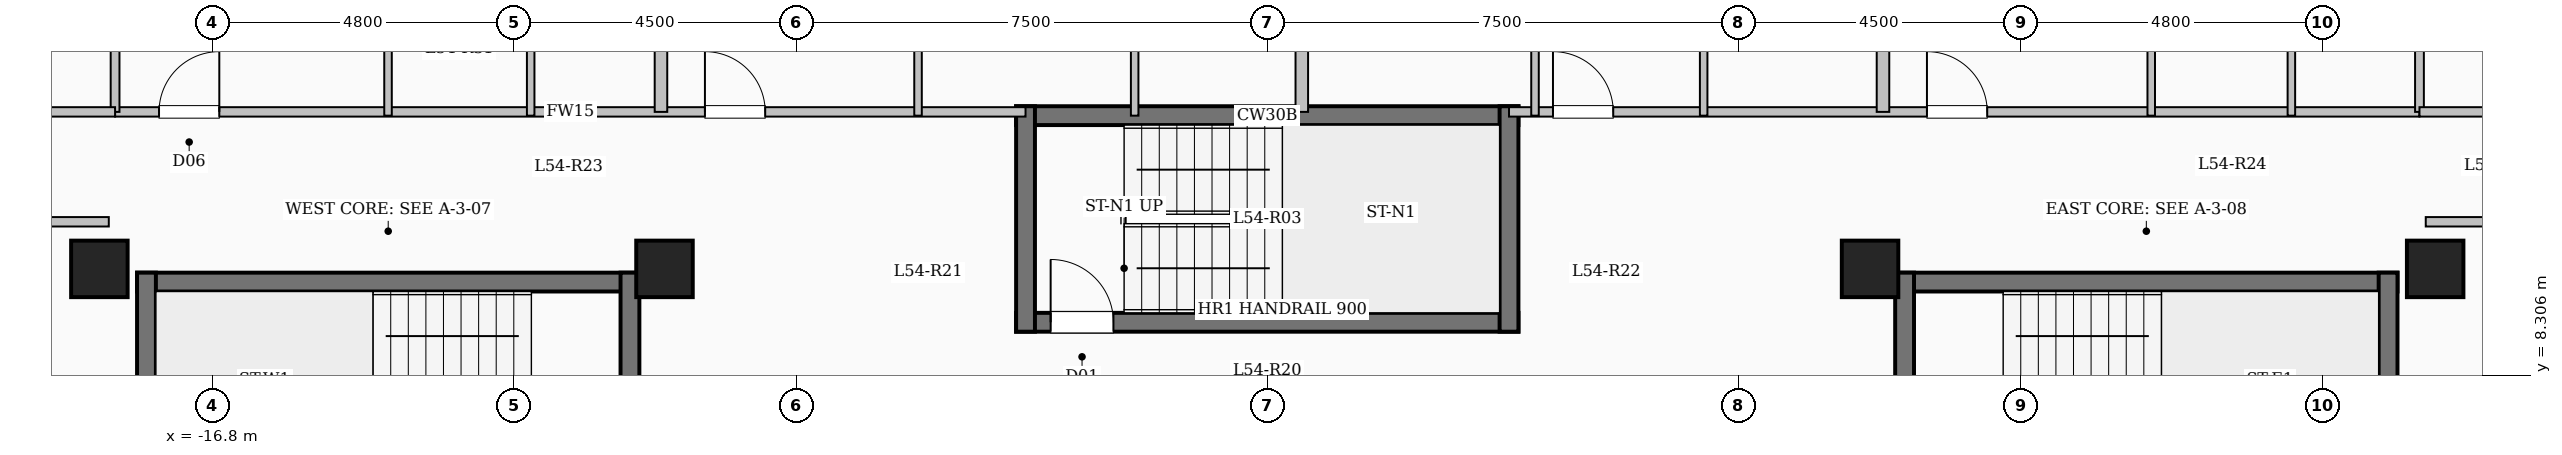
"""IFC4 building model, lengths in metres.
Left out: names, types, materials, properties, quantities, classifications, styles, units other than length and angle.
Written with IfcOpenShell. Run it as: python <this file> out.ifc"""

import sys

from ifc_helpers import new_model, si_unit, direction, frame, frame_2d, origin, origin_2d, place, context, subcontext, project, spatial, rectangle, extrude, element, fill, save


model = new_model("IFC4")
c1 = context("Model", 3, precision=1e-05, world=origin(), true_north=direction((0.0, 1.0)))
c2 = subcontext(c1, "Body", "Model", "MODEL_VIEW")
j1 = project(units=[si_unit("LENGTHUNIT", "METRE"), si_unit("PLANEANGLEUNIT", "RADIAN")], contexts=[c1])
p1 = place(None, origin())
s1 = spatial("IfcSite", under=j1, at=p1, CompositionType="ELEMENT")
p2 = place(p1, origin())
s2 = spatial("IfcBuilding", under=s1, at=p2, CompositionType="ELEMENT")
p3 = place(p2, frame((0.0, 0.0, 200.3)))
s3 = spatial("IfcBuildingStorey", under=s2, at=p3, CompositionType="ELEMENT", Elevation=200.3)
for number, where, z_axis, x_axis in (
    (1, (-9.6, 10.0, 0.0), (0.0, 0.0, 1.0), (1.0, 0.0, 0.0)),
    (2, (9.6, 10.0, 0.0), (0.0, 0.0, 1.0), (1.0, 0.0, 0.0)),
    (3, (-18.6, 10.0, 0.0), (0.0, 0.0, 1.0), (1.0, 0.0, 0.0)),
    (4, (18.6, 10.0, 0.0), (0.0, 0.0, 1.0), (1.0, 0.0, 0.0)),
):
    element("IfcColumn", number, at=place(p3, frame(where, z_axis=z_axis, x_axis=x_axis)), inside=s3, PredefinedType="COLUMN", context=c2, shape_type="SweptSolid", body=[
        extrude(rectangle(XDim=0.9, YDim=0.9, at=origin_2d()), origin(), (0.0, 0.0, 1.0), 3.35),
    ])
p4 = place(p3, frame((-18.0, 9.79, 0.0), z_axis=(0.0, 0.0, 1.0), x_axis=(1.0, 0.0, 0.0)))
e5 = element("IfcWall", 5, at=p4, inside=s3, PredefinedType="SHEAR", context=c2, shape_type="SweptSolid", body=[
    extrude(rectangle(XDim=8.0, YDim=0.3, at=frame_2d((4.0, 0.0))), origin(), (0.0, 0.0, 1.0), 3.35),
])
for number, where, z_axis, x_axis in (
    (6, (-17.85, 6.35, 0.0), (0.0, 0.0, 1.0), (0.0, 1.0, 0.0)),
    (7, (-10.15, 6.35, 0.0), (0.0, 0.0, 1.0), (0.0, 1.0, 0.0)),
):
    element("IfcWall", number, at=place(p3, frame(where, z_axis=z_axis, x_axis=x_axis)), inside=s3, PredefinedType="SHEAR", context=c2, shape_type="SweptSolid", body=[
        extrude(rectangle(XDim=3.59, YDim=0.3, at=frame_2d((1.795, 0.0))), origin(), (0.0, 0.0, 1.0), 3.35),
    ])
p5 = place(p3, frame((10.0, 9.79, 0.0), z_axis=(0.0, 0.0, 1.0), x_axis=(1.0, 0.0, 0.0)))
e8 = element("IfcWall", 8, at=p5, inside=s3, PredefinedType="SHEAR", context=c2, shape_type="SweptSolid", body=[
    extrude(rectangle(XDim=8.0, YDim=0.3, at=frame_2d((4.0, 0.0))), origin(), (0.0, 0.0, 1.0), 3.35),
])
for number, where, z_axis, x_axis in (
    (9, (10.15, 6.35, 0.0), (0.0, 0.0, 1.0), (0.0, 1.0, 0.0)),
    (10, (17.85, 6.35, 0.0), (0.0, 0.0, 1.0), (0.0, 1.0, 0.0)),
):
    element("IfcWall", number, at=place(p3, frame(where, z_axis=z_axis, x_axis=x_axis)), inside=s3, PredefinedType="SHEAR", context=c2, shape_type="SweptSolid", body=[
        extrude(rectangle(XDim=3.59, YDim=0.3, at=frame_2d((1.795, 0.0))), origin(), (0.0, 0.0, 1.0), 3.35),
    ])
p6 = place(p3, frame((-4.0, 12.44, 0.0), z_axis=(0.0, 0.0, 1.0), x_axis=(1.0, 0.0, 0.0)))
e11 = element("IfcWall", 11, at=p6, inside=s3, PredefinedType="SHEAR", context=c2, shape_type="SweptSolid", body=[
    extrude(rectangle(XDim=8.0, YDim=0.3, at=frame_2d((4.0, 0.0))), origin(), (0.0, 0.0, 1.0), 3.35),
])
p7 = place(p3, frame((-4.0, 9.15, 0.0), z_axis=(0.0, 0.0, 1.0), x_axis=(1.0, 0.0, 0.0)))
e12 = element("IfcWall", 12, at=p7, inside=s3, PredefinedType="SHEAR", context=c2, shape_type="SweptSolid", body=[
    extrude(rectangle(XDim=8.0, YDim=0.3, at=frame_2d((4.0, 0.0))), origin(), (0.0, 0.0, 1.0), 3.35),
])
p8 = place(p7, frame((0.55, 0.0, 0.0)))
e13 = element("IfcOpeningElement", 13, at=p8, cuts=e12, PredefinedType="OPENING", context=c2, shape_type="SweptSolid", body=[
    extrude(rectangle(XDim=1.0, YDim=2.15, at=frame_2d((0.5, 1.075))), frame((0.0, 0.16, 0.0), z_axis=(0.0, -1.0, 0.0), x_axis=(1.0, 0.0, 0.0)), (0.0, 0.0, 1.0), 0.32),
])
for number, where, z_axis, x_axis in (
    (14, (-3.85, 9.0, 0.0), (0.0, 0.0, 1.0), (0.0, 1.0, 0.0)),
    (15, (3.85, 9.0, 0.0), (0.0, 0.0, 1.0), (0.0, 1.0, 0.0)),
):
    element("IfcWall", number, at=place(p3, frame(where, z_axis=z_axis, x_axis=x_axis)), inside=s3, PredefinedType="SHEAR", context=c2, shape_type="SweptSolid", body=[
        extrude(rectangle(XDim=3.59, YDim=0.3, at=frame_2d((1.795, 0.0))), origin(), (0.0, 0.0, 1.0), 3.35),
    ])
p9 = place(p3, frame((-18.35, 12.5, 0.0), z_axis=(0.0, 0.0, 1.0), x_axis=(1.0, 0.0, 0.0)))
e16 = element("IfcWall", 16, at=p9, inside=s3, PredefinedType="PARTITIONING", context=c2, shape_type="SweptSolid", body=[
    extrude(rectangle(XDim=14.5, YDim=0.15, at=frame_2d((7.25, 0.0))), origin(), (0.0, 0.0, 1.0), 3.1),
])
p10 = place(p9, frame((0.7, 0.0, 0.0)))
e17 = element("IfcOpeningElement", 17, at=p10, cuts=e16, PredefinedType="OPENING", context=c2, shape_type="SweptSolid", body=[
    extrude(rectangle(XDim=0.96, YDim=2.15, at=frame_2d((0.48, 1.075))), frame((0.0, 0.085, 0.0), z_axis=(0.0, -1.0, 0.0), x_axis=(1.0, 0.0, 0.0)), (0.0, 0.0, 1.0), 0.17),
])
p11 = place(p9, frame((9.394, 0.0, 0.0)))
e18 = element("IfcOpeningElement", 18, at=p11, cuts=e16, PredefinedType="OPENING", context=c2, shape_type="SweptSolid", body=[
    extrude(rectangle(XDim=0.96, YDim=2.15, at=frame_2d((0.48, 1.075))), frame((0.0, 0.085, 0.0), z_axis=(0.0, -1.0, 0.0), x_axis=(1.0, 0.0, 0.0)), (0.0, 0.0, 1.0), 0.17),
])
p12 = place(p3, frame((3.85, 12.5, 0.0), z_axis=(0.0, 0.0, 1.0), x_axis=(1.0, 0.0, 0.0)))
e19 = element("IfcWall", 19, at=p12, inside=s3, PredefinedType="PARTITIONING", context=c2, shape_type="SweptSolid", body=[
    extrude(rectangle(XDim=14.5, YDim=0.15, at=frame_2d((7.25, 0.0))), origin(), (0.0, 0.0, 1.0), 3.1),
])
p13 = place(p12, frame((0.7, 0.0, 0.0)))
e20 = element("IfcOpeningElement", 20, at=p13, cuts=e19, PredefinedType="OPENING", context=c2, shape_type="SweptSolid", body=[
    extrude(rectangle(XDim=0.96, YDim=2.15, at=frame_2d((0.48, 1.075))), frame((0.0, 0.085, 0.0), z_axis=(0.0, -1.0, 0.0), x_axis=(1.0, 0.0, 0.0)), (0.0, 0.0, 1.0), 0.17),
])
p14 = place(p12, frame((6.656, 0.0, 0.0)))
e21 = element("IfcOpeningElement", 21, at=p14, cuts=e19, PredefinedType="OPENING", context=c2, shape_type="SweptSolid", body=[
    extrude(rectangle(XDim=0.96, YDim=2.15, at=frame_2d((0.48, 1.075))), frame((0.0, 0.085, 0.0), z_axis=(0.0, -1.0, 0.0), x_axis=(1.0, 0.0, 0.0)), (0.0, 0.0, 1.0), 0.17),
])
p15 = place(p3, frame((0.55, 12.5, 0.0), z_axis=(0.0, 0.0, 1.0), x_axis=(0.0, 1.0, 0.0)))
e22 = element("IfcWall", 22, at=p15, inside=s3, PredefinedType="SOLIDWALL", context=c2, shape_type="SweptSolid", body=[
    extrude(rectangle(XDim=9.88, YDim=0.2, at=frame_2d((4.94, 0.0))), origin(), (0.0, 0.0, 1.0), 3.1),
])
p16 = place(p3, frame((-9.656, 12.5, 0.0), z_axis=(0.0, 0.0, 1.0), x_axis=(0.0, 1.0, 0.0)))
e23 = element("IfcWall", 23, at=p16, inside=s3, PredefinedType="SOLIDWALL", context=c2, shape_type="SweptSolid", body=[
    extrude(rectangle(XDim=8.732, YDim=0.2, at=frame_2d((4.366, 0.0))), origin(), (0.0, 0.0, 1.0), 3.1),
])
p17 = place(p3, frame((-14.003, 12.44, 0.0), z_axis=(0.0, 0.0, 1.0), x_axis=(0.0, 1.0, 0.0)))
e24 = element("IfcWall", 24, at=p17, inside=s3, PredefinedType="PARTITIONING", context=c2, shape_type="SweptSolid", body=[
    extrude(rectangle(XDim=8.46, YDim=0.12, at=frame_2d((4.23, 0.0))), origin(), (0.0, 0.0, 1.0), 3.1),
])
p18 = place(p17, frame((2.905, 0.0, 0.0)))
e25 = element("IfcOpeningElement", 25, at=p18, cuts=e24, PredefinedType="OPENING", context=c2, shape_type="SweptSolid", body=[
    extrude(rectangle(XDim=1.08, YDim=2.15, at=frame_2d((0.54, 1.075))), frame((0.0, 0.07, 0.0), z_axis=(0.0, -1.0, 0.0), x_axis=(1.0, 0.0, 0.0)), (0.0, 0.0, 1.0), 0.14),
])
p19 = place(p3, frame((-11.731, 12.44, 0.0), z_axis=(0.0, 0.0, 1.0), x_axis=(0.0, 1.0, 0.0)))
e26 = element("IfcWall", 26, at=p19, inside=s3, PredefinedType="PARTITIONING", context=c2, shape_type="SweptSolid", body=[
    extrude(rectangle(XDim=2.62, YDim=0.12, at=frame_2d((1.31, 0.0))), origin(), (0.0, 0.0, 1.0), 3.1),
])
p20 = place(p3, frame((-5.562, 12.44, 0.0), z_axis=(0.0, 0.0, 1.0), x_axis=(0.0, 1.0, 0.0)))
e27 = element("IfcWall", 27, at=p20, inside=s3, PredefinedType="PARTITIONING", context=c2, shape_type="SweptSolid", body=[
    extrude(rectangle(XDim=9.801, YDim=0.12, at=frame_2d((4.9, 0.0))), origin(), (0.0, 0.0, 1.0), 3.1),
])
p21 = place(p20, frame((3.075, 0.0, 0.0)))
e28 = element("IfcOpeningElement", 28, at=p21, cuts=e27, PredefinedType="OPENING", context=c2, shape_type="SweptSolid", body=[
    extrude(rectangle(XDim=1.08, YDim=2.15, at=frame_2d((0.54, 1.075))), frame((0.0, 0.07, 0.0), z_axis=(0.0, -1.0, 0.0), x_axis=(1.0, 0.0, 0.0)), (0.0, 0.0, 1.0), 0.14),
])
p22 = place(p3, frame((-2.112, 12.44, 0.0), z_axis=(0.0, 0.0, 1.0), x_axis=(0.0, 1.0, 0.0)))
e29 = element("IfcWall", 29, at=p22, inside=s3, PredefinedType="PARTITIONING", context=c2, shape_type="SweptSolid", body=[
    extrude(rectangle(XDim=2.79, YDim=0.12, at=frame_2d((1.395, 0.0))), origin(), (0.0, 0.0, 1.0), 3.1),
])
p23 = place(p3, frame((9.806, 12.5, 0.0), z_axis=(0.0, 0.0, 1.0), x_axis=(0.0, 1.0, 0.0)))
e30 = element("IfcWall", 30, at=p23, inside=s3, PredefinedType="SOLIDWALL", context=c2, shape_type="SweptSolid", body=[
    extrude(rectangle(XDim=8.695, YDim=0.2, at=frame_2d((4.348, 0.0))), origin(), (0.0, 0.0, 1.0), 3.1),
])
p24 = place(p3, frame((4.264, 12.44, 0.0), z_axis=(0.0, 0.0, 1.0), x_axis=(0.0, 1.0, 0.0)))
e31 = element("IfcWall", 31, at=p24, inside=s3, PredefinedType="PARTITIONING", context=c2, shape_type="SweptSolid", body=[
    extrude(rectangle(XDim=9.94, YDim=0.12, at=frame_2d((4.97, 0.0))), origin(), (0.0, 0.0, 1.0), 3.1),
])
p25 = place(p24, frame((3.245, 0.0, 0.0)))
e32 = element("IfcOpeningElement", 32, at=p25, cuts=e31, PredefinedType="OPENING", context=c2, shape_type="SweptSolid", body=[
    extrude(rectangle(XDim=1.08, YDim=2.15, at=frame_2d((0.54, 1.075))), frame((0.0, 0.07, 0.0), z_axis=(0.0, -1.0, 0.0), x_axis=(1.0, 0.0, 0.0)), (0.0, 0.0, 1.0), 0.14),
])
p26 = place(p3, frame((6.95, 12.44, 0.0), z_axis=(0.0, 0.0, 1.0), x_axis=(0.0, 1.0, 0.0)))
e33 = element("IfcWall", 33, at=p26, inside=s3, PredefinedType="PARTITIONING", context=c2, shape_type="SweptSolid", body=[
    extrude(rectangle(XDim=2.96, YDim=0.12, at=frame_2d((1.48, 0.0))), origin(), (0.0, 0.0, 1.0), 3.1),
])
p27 = place(p3, frame((14.078, 12.44, 0.0), z_axis=(0.0, 0.0, 1.0), x_axis=(0.0, 1.0, 0.0)))
e34 = element("IfcWall", 34, at=p27, inside=s3, PredefinedType="PARTITIONING", context=c2, shape_type="SweptSolid", body=[
    extrude(rectangle(XDim=8.46, YDim=0.12, at=frame_2d((4.23, 0.0))), origin(), (0.0, 0.0, 1.0), 3.1),
])
p28 = place(p27, frame((2.735, 0.0, 0.0)))
e35 = element("IfcOpeningElement", 35, at=p28, cuts=e34, PredefinedType="OPENING", context=c2, shape_type="SweptSolid", body=[
    extrude(rectangle(XDim=1.08, YDim=2.15, at=frame_2d((0.54, 1.075))), frame((0.0, 0.07, 0.0), z_axis=(0.0, -1.0, 0.0), x_axis=(1.0, 0.0, 0.0)), (0.0, 0.0, 1.0), 0.14),
])
p29 = place(p3, frame((16.31, 12.44, 0.0), z_axis=(0.0, 0.0, 1.0), x_axis=(0.0, 1.0, 0.0)))
e36 = element("IfcWall", 36, at=p29, inside=s3, PredefinedType="PARTITIONING", context=c2, shape_type="SweptSolid", body=[
    extrude(rectangle(XDim=2.45, YDim=0.12, at=frame_2d((1.225, 0.0))), origin(), (0.0, 0.0, 1.0), 3.1),
])
for number, where, z_axis, x_axis in (
    (37, (-23.58, 10.75, 0.0), (0.0, 0.0, 1.0), (1.0, 0.0, 0.0)),
    (38, (18.45, 10.75, 0.0), (0.0, 0.0, 1.0), (1.0, 0.0, 0.0)),
):
    element("IfcWall", number, at=place(p3, frame(where, z_axis=z_axis, x_axis=x_axis)), inside=s3, PredefinedType="PARTITIONING", context=c2, shape_type="SweptSolid", body=[
        extrude(rectangle(XDim=5.13, YDim=0.15, at=frame_2d((2.565, 0.0))), origin(), (0.0, 0.0, 1.0), 3.1),
    ])
for number, where, z_axis, x_axis in (
    (39, (-18.35, 12.5, 0.0), (0.0, 0.0, 1.0), (0.0, 1.0, 0.0)),
    (40, (18.35, 12.5, 0.0), (0.0, 0.0, 1.0), (0.0, 1.0, 0.0)),
):
    element("IfcWall", number, at=place(p3, frame(where, z_axis=z_axis, x_axis=x_axis)), inside=s3, PredefinedType="PARTITIONING", context=c2, shape_type="SweptSolid", body=[
        extrude(rectangle(XDim=4.75, YDim=0.14, at=frame_2d((2.375, 0.0))), origin(), (0.0, 0.0, 1.0), 3.1),
    ])
p30 = place(p3, frame((-23.58, 12.5, 0.0), z_axis=(0.0, 0.0, 1.0), x_axis=(1.0, 0.0, 0.0)))
e41 = element("IfcWall", 41, at=p30, inside=s3, PredefinedType="PARTITIONING", context=c2, shape_type="SweptSolid", body=[
    extrude(rectangle(XDim=5.23, YDim=0.15, at=frame_2d((2.615, 0.0))), origin(), (0.0, 0.0, 1.0), 3.1),
])
p31 = place(p30, frame((2.14, 0.0, 0.0)))
e42 = element("IfcOpeningElement", 42, at=p31, cuts=e41, PredefinedType="OPENING", context=c2, shape_type="SweptSolid", body=[
    extrude(rectangle(XDim=0.95, YDim=2.15, at=frame_2d((0.475, 1.075))), frame((0.0, 0.085, 0.0), z_axis=(0.0, -1.0, 0.0), x_axis=(1.0, 0.0, 0.0)), (0.0, 0.0, 1.0), 0.17),
])
p32 = place(p3, frame((18.35, 12.5, 0.0), z_axis=(0.0, 0.0, 1.0), x_axis=(1.0, 0.0, 0.0)))
e43 = element("IfcWall", 43, at=p32, inside=s3, PredefinedType="PARTITIONING", context=c2, shape_type="SweptSolid", body=[
    extrude(rectangle(XDim=5.23, YDim=0.15, at=frame_2d((2.615, 0.0))), origin(), (0.0, 0.0, 1.0), 3.1),
])
p33 = place(p32, frame((2.14, 0.0, 0.0)))
e44 = element("IfcOpeningElement", 44, at=p33, cuts=e43, PredefinedType="OPENING", context=c2, shape_type="SweptSolid", body=[
    extrude(rectangle(XDim=0.95, YDim=2.15, at=frame_2d((0.475, 1.075))), frame((0.0, 0.085, 0.0), z_axis=(0.0, -1.0, 0.0), x_axis=(1.0, 0.0, 0.0)), (0.0, 0.0, 1.0), 0.17),
])
p34 = place(p8, origin())
e45 = element("IfcDoor", 45, at=p34, inside=s3, OperationType="SINGLE_SWING_LEFT", PredefinedType="DOOR", context=c2, shape_type="SweptSolid", body=[
    extrude(rectangle(XDim=1.0, YDim=2.15, at=frame_2d((0.5, 1.075))), frame((0.0, 0.025, 0.0), z_axis=(0.0, -1.0, 0.0), x_axis=(1.0, 0.0, 0.0)), (0.0, 0.0, 1.0), 0.05),
])
fill(e13, e45)
p35 = place(p10, origin())
e46 = element("IfcDoor", 46, at=p35, inside=s3, OperationType="SINGLE_SWING_RIGHT", PredefinedType="DOOR", context=c2, shape_type="SweptSolid", body=[
    extrude(rectangle(XDim=0.96, YDim=2.15, at=frame_2d((0.48, 1.075))), frame((0.0, 0.025, 0.0), z_axis=(0.0, -1.0, 0.0), x_axis=(1.0, 0.0, 0.0)), (0.0, 0.0, 1.0), 0.05),
])
fill(e17, e46)
p36 = place(p11, origin())
e47 = element("IfcDoor", 47, at=p36, inside=s3, OperationType="SINGLE_SWING_LEFT", PredefinedType="DOOR", context=c2, shape_type="SweptSolid", body=[
    extrude(rectangle(XDim=0.96, YDim=2.15, at=frame_2d((0.48, 1.075))), frame((0.0, 0.025, 0.0), z_axis=(0.0, -1.0, 0.0), x_axis=(1.0, 0.0, 0.0)), (0.0, 0.0, 1.0), 0.05),
])
fill(e18, e47)
p37 = place(p13, origin())
e48 = element("IfcDoor", 48, at=p37, inside=s3, OperationType="SINGLE_SWING_LEFT", PredefinedType="DOOR", context=c2, shape_type="SweptSolid", body=[
    extrude(rectangle(XDim=0.96, YDim=2.15, at=frame_2d((0.48, 1.075))), frame((0.0, 0.025, 0.0), z_axis=(0.0, -1.0, 0.0), x_axis=(1.0, 0.0, 0.0)), (0.0, 0.0, 1.0), 0.05),
])
fill(e20, e48)
p38 = place(p14, origin())
e49 = element("IfcDoor", 49, at=p38, inside=s3, OperationType="SINGLE_SWING_LEFT", PredefinedType="DOOR", context=c2, shape_type="SweptSolid", body=[
    extrude(rectangle(XDim=0.96, YDim=2.15, at=frame_2d((0.48, 1.075))), frame((0.0, 0.025, 0.0), z_axis=(0.0, -1.0, 0.0), x_axis=(1.0, 0.0, 0.0)), (0.0, 0.0, 1.0), 0.05),
])
fill(e21, e49)
save(model, sys.argv[1])
